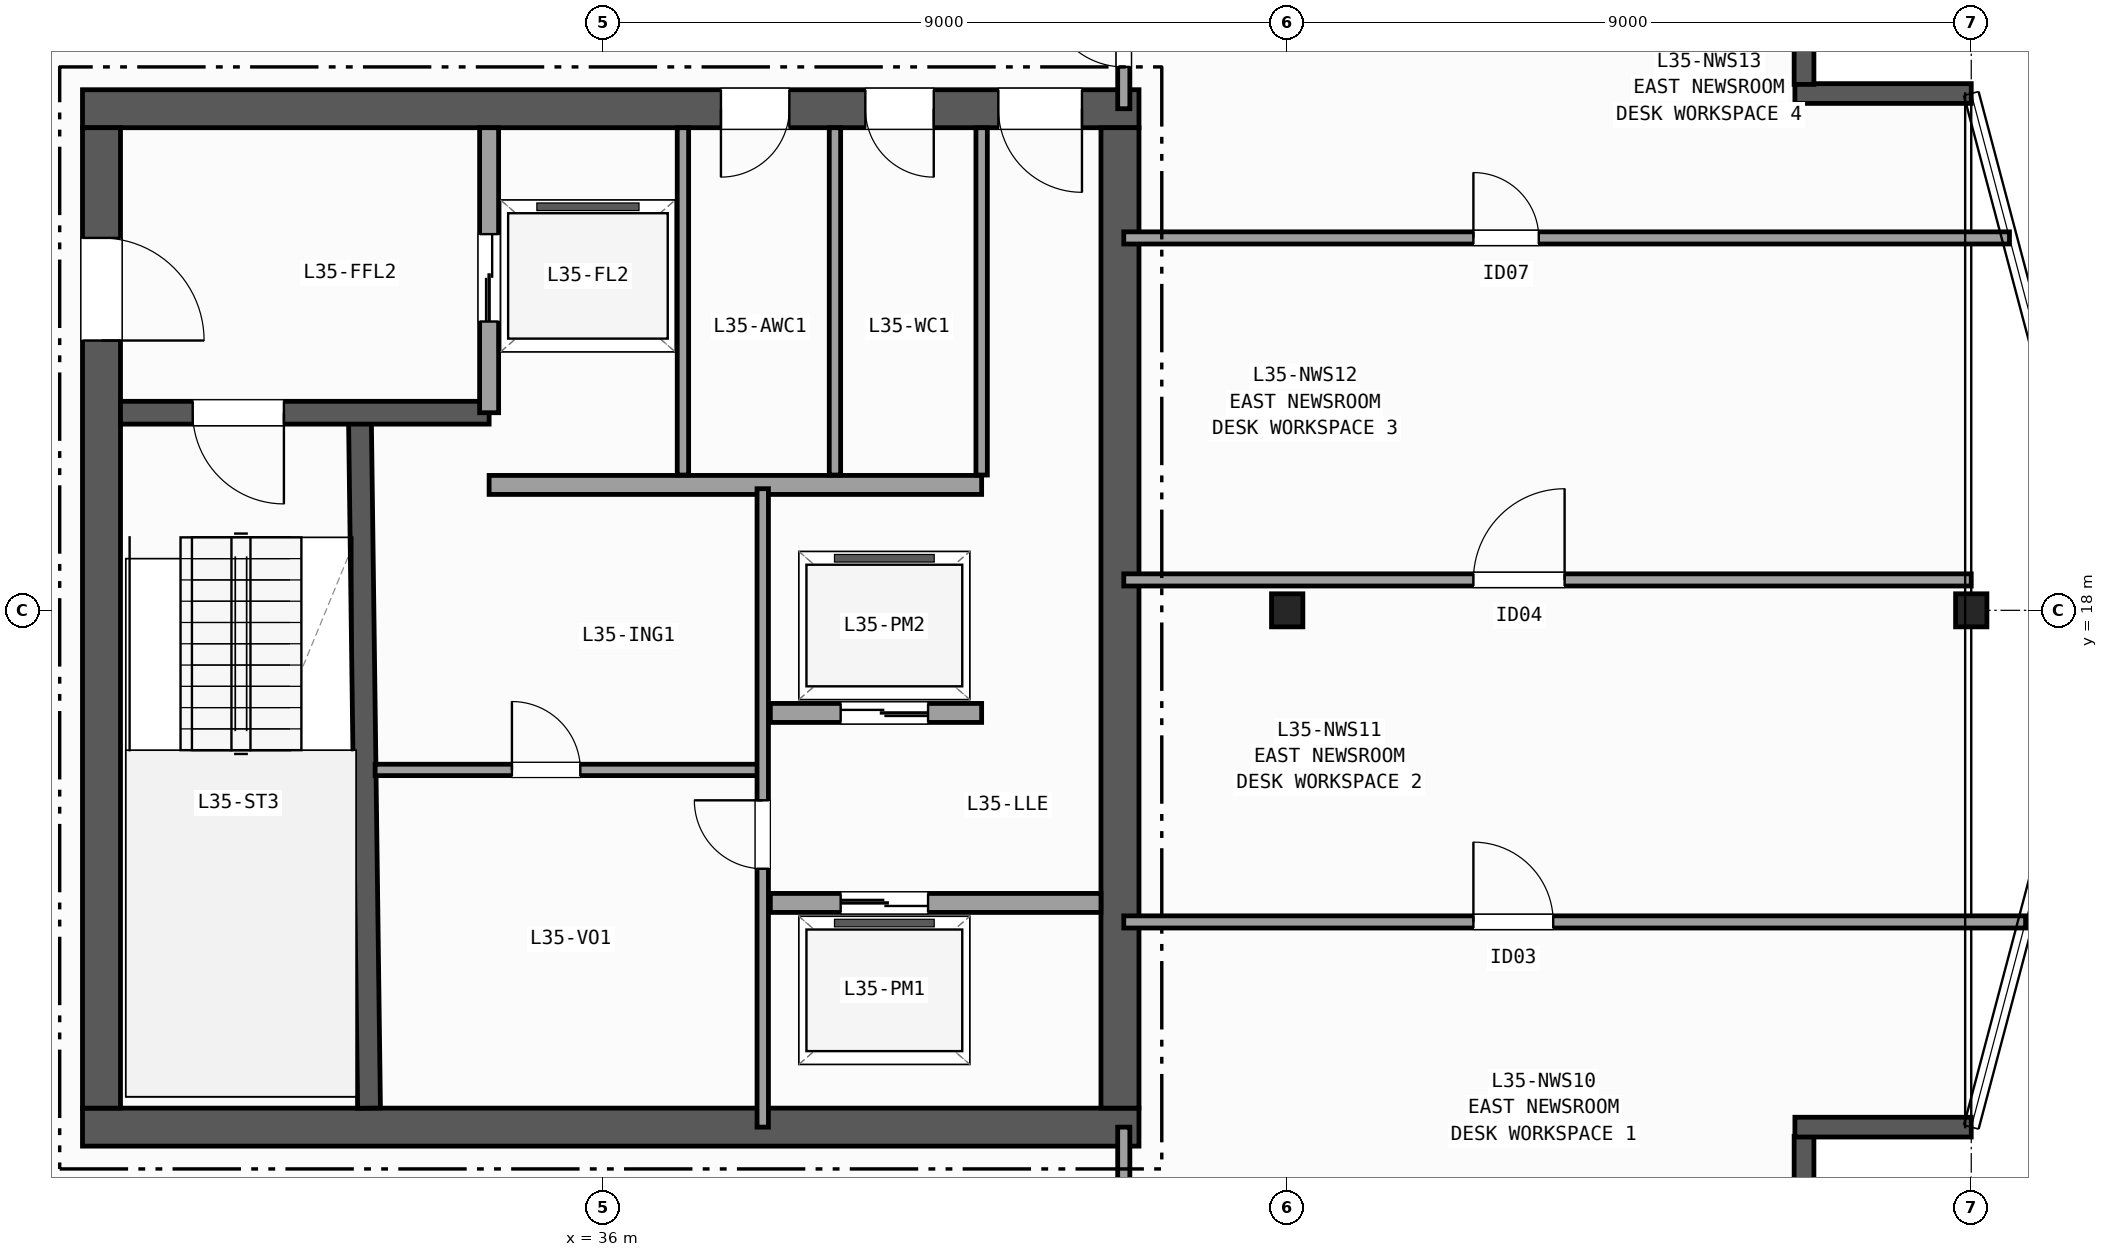
"""IFC4 building model, lengths in metres.
Left out: names, types, materials, properties, quantities, classifications, styles, units other than length and angle.
Written with IfcOpenShell. Run it as: python <this file> out.ifc"""

import sys

from ifc_helpers import new_model, si_unit, direction, frame, frame_2d, origin, origin_2d, place, context, subcontext, project, spatial, rectangle, i_section, extrude, element, fill, save


model = new_model("IFC4")
c1 = context("Model", 3, precision=1e-05, world=origin(), true_north=direction((0.0, 1.0)))
c2 = subcontext(c1, "Body", "Model", "MODEL_VIEW")
j1 = project(units=[si_unit("LENGTHUNIT", "METRE"), si_unit("PLANEANGLEUNIT", "RADIAN")], contexts=[c1])
p1 = place(None, origin())
s1 = spatial("IfcSite", under=j1, at=p1, CompositionType="ELEMENT")
p2 = place(p1, origin())
s2 = spatial("IfcBuilding", under=s1, at=p2, CompositionType="ELEMENT")
p3 = place(p2, frame((0.0, 0.0, 143.3)))
s3 = spatial("IfcBuildingStorey", under=s2, at=p3, CompositionType="ELEMENT", Elevation=143.3)
for number, where, z_axis, x_axis in (
    (1, (45.0, 18.0, 0.0), (0.0, 0.0, 1.0), (1.0, 0.0, 0.0)),
    (2, (54.0, 18.0, 0.0), (0.0, 0.0, 1.0), (1.0, 0.0, 0.0)),
):
    element("IfcColumn", number, at=place(p3, frame(where, z_axis=z_axis, x_axis=x_axis)), inside=s3, PredefinedType="COLUMN", context=c2, shape_type="SweptSolid", body=[
        extrude(i_section(OverallWidth=0.412, OverallDepth=0.435, WebThickness=0.036, FlangeThickness=0.057, FilletRadius=0.015, at=origin_2d()), origin(), (0.0, 0.0, 1.0), 3.7),
    ])
p4 = place(p3, frame((51.8, 9.0, 0.0), z_axis=(0.0, 0.0, 1.0), x_axis=(0.0, 1.0, 0.0)))
e3 = element("IfcWall", 3, at=p4, inside=s3, PredefinedType="SOLIDWALL", context=c2, shape_type="SweptSolid", body=[
    extrude(rectangle(XDim=2.08, YDim=0.26, at=frame_2d((1.04, 0.0))), origin(), (0.0, 0.0, 1.0), 3.42),
])
for number, where, z_axis, x_axis in (
    (4, (51.68, 11.2, 0.0), (0.0, 0.0, 1.0), (1.0, 0.0, 0.0)),
    (5, (54.0, 24.8, 0.0), (0.0, 0.0, 1.0), (-1.0, 0.0, 0.0)),
):
    element("IfcWall", number, at=place(p3, frame(where, z_axis=z_axis, x_axis=x_axis)), inside=s3, PredefinedType="SOLIDWALL", context=c2, shape_type="SweptSolid", body=[
        extrude(rectangle(XDim=2.32, YDim=0.26, at=frame_2d((1.16, 0.0))), origin(), (0.0, 0.0, 1.0), 3.42),
    ])
p5 = place(p3, frame((51.8, 24.92, 0.0), z_axis=(0.0, 0.0, 1.0), x_axis=(0.0, 1.0, 0.0)))
e6 = element("IfcWall", 6, at=p5, inside=s3, PredefinedType="SOLIDWALL", context=c2, shape_type="SweptSolid", body=[
    extrude(rectangle(XDim=2.08, YDim=0.26, at=frame_2d((1.04, 0.0))), origin(), (0.0, 0.0, 1.0), 3.42),
])
p6 = place(p3, frame((29.15, 11.2, 0.0), z_axis=(0.0, 0.0, 1.0), x_axis=(1.0, 0.0, 0.0)))
e7 = element("IfcWall", 7, at=p6, inside=s3, PredefinedType="SHEAR", context=c2, shape_type="SweptSolid", body=[
    extrude(rectangle(XDim=13.9, YDim=0.5, at=frame_2d((6.95, 0.0))), origin(), (0.0, 0.0, 1.0), 3.42),
])
p7 = place(p3, frame((43.05, 24.6, 0.0), z_axis=(0.0, 0.0, 1.0), x_axis=(-1.0, 0.0, 0.0)))
e8 = element("IfcWall", 8, at=p7, inside=s3, PredefinedType="SHEAR", context=c2, shape_type="SweptSolid", body=[
    extrude(rectangle(XDim=13.9, YDim=0.5, at=frame_2d((6.95, 0.0))), origin(), (0.0, 0.0, 1.0), 3.42),
])
p8 = place(p7, frame((0.75, 0.0, 0.0)))
e9 = element("IfcOpeningElement", 9, at=p8, cuts=e8, PredefinedType="OPENING", context=c2, shape_type="SweptSolid", body=[
    extrude(rectangle(XDim=1.1, YDim=2.15, at=frame_2d((0.55, 1.075))), frame((0.0, 0.26, 0.0), z_axis=(0.0, -1.0, 0.0), x_axis=(1.0, 0.0, 0.0)), (0.0, 0.0, 1.0), 0.52),
])
p9 = place(p7, frame((2.7, 0.0, 0.0)))
e10 = element("IfcOpeningElement", 10, at=p9, cuts=e8, PredefinedType="OPENING", context=c2, shape_type="SweptSolid", body=[
    extrude(rectangle(XDim=0.9, YDim=2.1, at=frame_2d((0.45, 1.05))), frame((0.0, 0.26, 0.0), z_axis=(0.0, -1.0, 0.0), x_axis=(1.0, 0.0, 0.0)), (0.0, 0.0, 1.0), 0.52),
])
p10 = place(p7, frame((4.6, 0.0, 0.0)))
e11 = element("IfcOpeningElement", 11, at=p10, cuts=e8, PredefinedType="OPENING", context=c2, shape_type="SweptSolid", body=[
    extrude(rectangle(XDim=0.9, YDim=2.1, at=frame_2d((0.45, 1.05))), frame((0.0, 0.26, 0.0), z_axis=(0.0, -1.0, 0.0), x_axis=(1.0, 0.0, 0.0)), (0.0, 0.0, 1.0), 0.52),
])
p11 = place(p3, frame((29.4, 24.35, 0.0), z_axis=(0.0, 0.0, 1.0), x_axis=(0.0, -1.0, 0.0)))
e12 = element("IfcWall", 12, at=p11, inside=s3, PredefinedType="SHEAR", context=c2, shape_type="SweptSolid", body=[
    extrude(rectangle(XDim=12.9, YDim=0.5, at=frame_2d((6.45, 0.0))), origin(), (0.0, 0.0, 1.0), 3.42),
])
p12 = place(p11, frame((1.45, 0.0, 0.0)))
e13 = element("IfcOpeningElement", 13, at=p12, cuts=e12, PredefinedType="OPENING", context=c2, shape_type="SweptSolid", body=[
    extrude(rectangle(XDim=1.35, YDim=2.15, at=frame_2d((0.675, 1.075))), frame((0.0, 0.26, 0.0), z_axis=(0.0, -1.0, 0.0), x_axis=(1.0, 0.0, 0.0)), (0.0, 0.0, 1.0), 0.52),
])
p13 = place(p3, frame((42.8, 11.45, 0.0), z_axis=(0.0, 0.0, 1.0), x_axis=(0.0, 1.0, 0.0)))
e14 = element("IfcWall", 14, at=p13, inside=s3, PredefinedType="SHEAR", context=c2, shape_type="SweptSolid", body=[
    extrude(rectangle(XDim=12.9, YDim=0.5, at=frame_2d((6.45, 0.0))), origin(), (0.0, 0.0, 1.0), 3.42),
])
p14 = place(p3, frame((32.92, 11.45, 0.0), z_axis=(0.0, 0.0, 1.0), x_axis=(-0.013171578211, 0.999913251001, 0.0)))
e15 = element("IfcWall", 15, at=p14, inside=s3, PredefinedType="SHEAR", context=c2, shape_type="SweptSolid", body=[
    extrude(rectangle(XDim=9.101, YDim=0.3, at=frame_2d((4.55, 0.0))), origin(), (0.0, 0.0, 1.0), 3.42),
])
p15 = place(p3, frame((34.5, 20.6, 0.0), z_axis=(0.0, 0.0, 1.0), x_axis=(-1.0, 0.0, 0.0)))
e16 = element("IfcWall", 16, at=p15, inside=s3, PredefinedType="SHEAR", context=c2, shape_type="SweptSolid", body=[
    extrude(rectangle(XDim=4.85, YDim=0.3, at=frame_2d((2.425, 0.0))), origin(), (0.0, 0.0, 1.0), 3.42),
])
p16 = place(p15, frame((2.7, 0.0, 0.0)))
e17 = element("IfcOpeningElement", 17, at=p16, cuts=e16, PredefinedType="OPENING", context=c2, shape_type="SweptSolid", body=[
    extrude(rectangle(XDim=1.2, YDim=2.15, at=frame_2d((0.6, 1.075))), frame((0.0, 0.16, 0.0), z_axis=(0.0, -1.0, 0.0), x_axis=(1.0, 0.0, 0.0)), (0.0, 0.0, 1.0), 0.32),
])
p17 = place(p3, frame((34.5, 20.6, 0.0), z_axis=(0.0, 0.0, 1.0), x_axis=(0.0, 1.0, 0.0)))
e18 = element("IfcWall", 18, at=p17, inside=s3, PredefinedType="PARTITIONING", context=c2, shape_type="SweptSolid", body=[
    extrude(rectangle(XDim=3.75, YDim=0.25, at=frame_2d((1.875, 0.0))), origin(), (0.0, 0.0, 1.0), 3.42),
])
p18 = place(p17, frame((1.2, 0.0, 0.0)))
e19 = element("IfcOpeningElement", 19, at=p18, cuts=e18, PredefinedType="OPENING", context=c2, shape_type="SweptSolid", body=[
    extrude(rectangle(XDim=1.15, YDim=2.15, at=frame_2d((0.575, 1.075))), frame((0.0, 0.135, 0.0), z_axis=(0.0, -1.0, 0.0), x_axis=(1.0, 0.0, 0.0)), (0.0, 0.0, 1.0), 0.27),
])
p19 = place(p3, frame((34.5, 19.65, 0.0), z_axis=(0.0, 0.0, 1.0), x_axis=(1.0, 0.0, 0.0)))
e20 = element("IfcWall", 20, at=p19, inside=s3, PredefinedType="PARTITIONING", context=c2, shape_type="SweptSolid", body=[
    extrude(rectangle(XDim=6.48, YDim=0.25, at=frame_2d((3.24, 0.0))), origin(), (0.0, 0.0, 1.0), 3.42),
])
p20 = place(p3, frame((38.2, 14.15, 0.0), z_axis=(0.0, 0.0, 1.0), x_axis=(1.0, 0.0, 0.0)))
e21 = element("IfcWall", 21, at=p20, inside=s3, PredefinedType="PARTITIONING", context=c2, shape_type="SweptSolid", body=[
    extrude(rectangle(XDim=4.35, YDim=0.25, at=frame_2d((2.175, 0.0))), origin(), (0.0, 0.0, 1.0), 3.42),
])
p21 = place(p20, frame((0.925, 0.0, 0.0)))
e22 = element("IfcOpeningElement", 22, at=p21, cuts=e21, PredefinedType="OPENING", context=c2, shape_type="SweptSolid", body=[
    extrude(rectangle(XDim=1.15, YDim=2.15, at=frame_2d((0.575, 1.075))), frame((0.0, 0.135, 0.0), z_axis=(0.0, -1.0, 0.0), x_axis=(1.0, 0.0, 0.0)), (0.0, 0.0, 1.0), 0.27),
])
p22 = place(p3, frame((40.98, 16.65, 0.0), z_axis=(0.0, 0.0, 1.0), x_axis=(-1.0, 0.0, 0.0)))
e23 = element("IfcWall", 23, at=p22, inside=s3, PredefinedType="PARTITIONING", context=c2, shape_type="SweptSolid", body=[
    extrude(rectangle(XDim=2.78, YDim=0.25, at=frame_2d((1.39, 0.0))), origin(), (0.0, 0.0, 1.0), 3.42),
])
p23 = place(p22, frame((0.705, 0.0, 0.0)))
e24 = element("IfcOpeningElement", 24, at=p23, cuts=e23, PredefinedType="OPENING", context=c2, shape_type="SweptSolid", body=[
    extrude(rectangle(XDim=1.15, YDim=2.15, at=frame_2d((0.575, 1.075))), frame((0.0, 0.135, 0.0), z_axis=(0.0, -1.0, 0.0), x_axis=(1.0, 0.0, 0.0)), (0.0, 0.0, 1.0), 0.27),
])
p24 = place(p3, frame((33.0, 15.9, 0.0), z_axis=(0.0, 0.0, 1.0), x_axis=(1.0, 0.0, 0.0)))
e25 = element("IfcWall", 25, at=p24, inside=s3, PredefinedType="PARTITIONING", context=c2, shape_type="SweptSolid", body=[
    extrude(rectangle(XDim=5.1, YDim=0.15, at=frame_2d((2.55, 0.0))), origin(), (0.0, 0.0, 1.0), 3.42),
])
p25 = place(p24, frame((1.8, 0.0, 0.0)))
e26 = element("IfcOpeningElement", 26, at=p25, cuts=e25, PredefinedType="OPENING", context=c2, shape_type="SweptSolid", body=[
    extrude(rectangle(XDim=0.9, YDim=2.1, at=frame_2d((0.45, 1.05))), frame((0.0, 0.085, 0.0), z_axis=(0.0, -1.0, 0.0), x_axis=(1.0, 0.0, 0.0)), (0.0, 0.0, 1.0), 0.17),
])
p26 = place(p3, frame((38.1, 11.2, 0.0), z_axis=(0.0, 0.0, 1.0), x_axis=(0.0, 1.0, 0.0)))
e27 = element("IfcWall", 27, at=p26, inside=s3, PredefinedType="PARTITIONING", context=c2, shape_type="SweptSolid", body=[
    extrude(rectangle(XDim=8.4, YDim=0.15, at=frame_2d((4.2, 0.0))), origin(), (0.0, 0.0, 1.0), 3.42),
])
p27 = place(p26, frame((3.4, 0.0, 0.0)))
e28 = element("IfcOpeningElement", 28, at=p27, cuts=e27, PredefinedType="OPENING", context=c2, shape_type="SweptSolid", body=[
    extrude(rectangle(XDim=0.9, YDim=2.1, at=frame_2d((0.45, 1.05))), frame((0.0, 0.085, 0.0), z_axis=(0.0, -1.0, 0.0), x_axis=(1.0, 0.0, 0.0)), (0.0, 0.0, 1.0), 0.17),
])
for number, where, z_axis, x_axis in (
    (29, (37.05, 19.78, 0.0), (0.0, 0.0, 1.0), (0.0, 1.0, 0.0)),
    (30, (39.05, 19.78, 0.0), (0.0, 0.0, 1.0), (0.0, 1.0, 0.0)),
    (31, (40.98, 19.78, 0.0), (0.0, 0.0, 1.0), (0.0, 1.0, 0.0)),
):
    element("IfcWall", number, at=place(p3, frame(where, z_axis=z_axis, x_axis=x_axis)), inside=s3, PredefinedType="PARTITIONING", context=c2, shape_type="SweptSolid", body=[
        extrude(rectangle(XDim=4.57, YDim=0.15, at=frame_2d((2.285, 0.0))), origin(), (0.0, 0.0, 1.0), 3.42),
    ])
p28 = place(p3, frame((42.85, 9.0, 0.0), z_axis=(0.0, 0.0, 1.0), x_axis=(0.0, 1.0, 0.0)))
e32 = element("IfcWall", 32, at=p28, inside=s3, PredefinedType="PARTITIONING", context=c2, shape_type="SweptSolid", body=[
    extrude(rectangle(XDim=2.2, YDim=0.16, at=frame_2d((1.1, 0.0))), origin(), (0.0, 0.0, 1.0), 2.634),
])
p29 = place(p3, frame((42.85, 24.6, 0.0), z_axis=(0.0, 0.0, 1.0), x_axis=(0.0, 1.0, 0.0)))
e33 = element("IfcWall", 33, at=p29, inside=s3, PredefinedType="PARTITIONING", context=c2, shape_type="SweptSolid", body=[
    extrude(rectangle(XDim=2.4, YDim=0.16, at=frame_2d((1.2, 0.0))), origin(), (0.0, 0.0, 1.0), 2.634),
])
p30 = place(p29, frame((0.55, 0.0, 0.0)))
e34 = element("IfcOpeningElement", 34, at=p30, cuts=e33, PredefinedType="OPENING", context=c2, shape_type="SweptSolid", body=[
    extrude(rectangle(XDim=1.0, YDim=2.1, at=frame_2d((0.5, 1.05))), frame((0.0, 0.09, 0.0), z_axis=(0.0, -1.0, 0.0), x_axis=(1.0, 0.0, 0.0)), (0.0, 0.0, 1.0), 0.18),
])
p31 = place(p3, frame((42.85, 13.9, 0.0), z_axis=(0.0, 0.0, 1.0), x_axis=(1.0, 0.0, 0.0)))
e35 = element("IfcWall", 35, at=p31, inside=s3, PredefinedType="PARTITIONING", context=c2, shape_type="SweptSolid", body=[
    extrude(rectangle(XDim=11.865, YDim=0.16, at=frame_2d((5.933, 0.0))), origin(), (0.0, 0.0, 1.0), 3.42),
])
p32 = place(p31, frame((4.6, 0.0, 0.0)))
e36 = element("IfcOpeningElement", 36, at=p32, cuts=e35, PredefinedType="OPENING", context=c2, shape_type="SweptSolid", body=[
    extrude(rectangle(XDim=1.05, YDim=2.15, at=frame_2d((0.525, 1.075))), frame((0.0, 0.09, 0.0), z_axis=(0.0, -1.0, 0.0), x_axis=(1.0, 0.0, 0.0)), (0.0, 0.0, 1.0), 0.18),
])
p33 = place(p3, frame((42.85, 18.4, 0.0), z_axis=(0.0, 0.0, 1.0), x_axis=(1.0, 0.0, 0.0)))
e37 = element("IfcWall", 37, at=p33, inside=s3, PredefinedType="PARTITIONING", context=c2, shape_type="SweptSolid", body=[
    extrude(rectangle(XDim=11.15, YDim=0.16, at=frame_2d((5.575, 0.0))), origin(), (0.0, 0.0, 1.0), 3.42),
])
p34 = place(p33, frame((4.6, 0.0, 0.0)))
e38 = element("IfcOpeningElement", 38, at=p34, cuts=e37, PredefinedType="OPENING", context=c2, shape_type="SweptSolid", body=[
    extrude(rectangle(XDim=1.2, YDim=2.15, at=frame_2d((0.6, 1.075))), frame((0.0, 0.09, 0.0), z_axis=(0.0, -1.0, 0.0), x_axis=(1.0, 0.0, 0.0)), (0.0, 0.0, 1.0), 0.18),
])
p35 = place(p3, frame((42.85, 22.9, 0.0), z_axis=(0.0, 0.0, 1.0), x_axis=(1.0, 0.0, 0.0)))
e39 = element("IfcWall", 39, at=p35, inside=s3, PredefinedType="PARTITIONING", context=c2, shape_type="SweptSolid", body=[
    extrude(rectangle(XDim=11.653, YDim=0.16, at=frame_2d((5.826, 0.0))), origin(), (0.0, 0.0, 1.0), 3.42),
])
p36 = place(p35, frame((4.6, 0.0, 0.0)))
e40 = element("IfcOpeningElement", 40, at=p36, cuts=e39, PredefinedType="OPENING", context=c2, shape_type="SweptSolid", body=[
    extrude(rectangle(XDim=0.86, YDim=2.05, at=frame_2d((0.43, 1.025))), frame((0.0, 0.09, 0.0), z_axis=(0.0, -1.0, 0.0), x_axis=(1.0, 0.0, 0.0)), (0.0, 0.0, 1.0), 0.18),
])
p37 = place(p16, origin())
e41 = element("IfcDoor", 41, at=p37, inside=s3, OperationType="SINGLE_SWING_LEFT", PredefinedType="DOOR", context=c2, shape_type="SweptSolid", body=[
    extrude(rectangle(XDim=1.2, YDim=2.15, at=frame_2d((0.6, 1.075))), frame((0.0, 0.025, 0.0), z_axis=(0.0, -1.0, 0.0), x_axis=(1.0, 0.0, 0.0)), (0.0, 0.0, 1.0), 0.05),
])
fill(e17, e41)
p38 = place(p12, origin())
e42 = element("IfcDoor", 42, at=p38, inside=s3, OperationType="SINGLE_SWING_RIGHT", PredefinedType="DOOR", context=c2, shape_type="SweptSolid", body=[
    extrude(rectangle(XDim=1.35, YDim=2.15, at=frame_2d((0.675, 1.075))), frame((0.0, 0.025, 0.0), z_axis=(0.0, -1.0, 0.0), x_axis=(1.0, 0.0, 0.0)), (0.0, 0.0, 1.0), 0.05),
])
fill(e13, e42)
p39 = place(p8, origin())
e43 = element("IfcDoor", 43, at=p39, inside=s3, OperationType="SINGLE_SWING_LEFT", PredefinedType="DOOR", context=c2, shape_type="SweptSolid", body=[
    extrude(rectangle(XDim=1.1, YDim=2.15, at=frame_2d((0.55, 1.075))), frame((0.0, 0.025, 0.0), z_axis=(0.0, -1.0, 0.0), x_axis=(1.0, 0.0, 0.0)), (0.0, 0.0, 1.0), 0.05),
])
fill(e9, e43)
p40 = place(p9, origin())
e44 = element("IfcDoor", 44, at=p40, inside=s3, OperationType="SINGLE_SWING_LEFT", PredefinedType="DOOR", context=c2, shape_type="SweptSolid", body=[
    extrude(rectangle(XDim=0.9, YDim=2.1, at=frame_2d((0.45, 1.05))), frame((0.0, 0.025, 0.0), z_axis=(0.0, -1.0, 0.0), x_axis=(1.0, 0.0, 0.0)), (0.0, 0.0, 1.0), 0.05),
])
fill(e10, e44)
p41 = place(p10, origin())
e45 = element("IfcDoor", 45, at=p41, inside=s3, OperationType="SINGLE_SWING_RIGHT", PredefinedType="DOOR", context=c2, shape_type="SweptSolid", body=[
    extrude(rectangle(XDim=0.9, YDim=2.1, at=frame_2d((0.45, 1.05))), frame((0.0, 0.025, 0.0), z_axis=(0.0, -1.0, 0.0), x_axis=(1.0, 0.0, 0.0)), (0.0, 0.0, 1.0), 0.05),
])
fill(e11, e45)
p42 = place(p18, origin())
e46 = element("IfcDoor", 46, at=p42, inside=s3, OperationType="DOUBLE_DOOR_SLIDING", PredefinedType="DOOR", context=c2, shape_type="SweptSolid", body=[
    extrude(rectangle(XDim=1.15, YDim=2.15, at=frame_2d((0.575, 1.075))), frame((0.0, 0.025, 0.0), z_axis=(0.0, -1.0, 0.0), x_axis=(1.0, 0.0, 0.0)), (0.0, 0.0, 1.0), 0.05),
])
fill(e19, e46)
p43 = place(p21, origin())
e47 = element("IfcDoor", 47, at=p43, inside=s3, OperationType="DOUBLE_DOOR_SLIDING", PredefinedType="DOOR", context=c2, shape_type="SweptSolid", body=[
    extrude(rectangle(XDim=1.15, YDim=2.15, at=frame_2d((0.575, 1.075))), frame((0.0, 0.025, 0.0), z_axis=(0.0, -1.0, 0.0), x_axis=(1.0, 0.0, 0.0)), (0.0, 0.0, 1.0), 0.05),
])
fill(e22, e47)
p44 = place(p23, origin())
e48 = element("IfcDoor", 48, at=p44, inside=s3, OperationType="DOUBLE_DOOR_SLIDING", PredefinedType="DOOR", context=c2, shape_type="SweptSolid", body=[
    extrude(rectangle(XDim=1.15, YDim=2.15, at=frame_2d((0.575, 1.075))), frame((0.0, 0.025, 0.0), z_axis=(0.0, -1.0, 0.0), x_axis=(1.0, 0.0, 0.0)), (0.0, 0.0, 1.0), 0.05),
])
fill(e24, e48)
p45 = place(p27, origin())
e49 = element("IfcDoor", 49, at=p45, inside=s3, OperationType="SINGLE_SWING_RIGHT", PredefinedType="DOOR", context=c2, shape_type="SweptSolid", body=[
    extrude(rectangle(XDim=0.9, YDim=2.1, at=frame_2d((0.45, 1.05))), frame((0.0, 0.025, 0.0), z_axis=(0.0, -1.0, 0.0), x_axis=(1.0, 0.0, 0.0)), (0.0, 0.0, 1.0), 0.05),
])
fill(e28, e49)
p46 = place(p25, origin())
e50 = element("IfcDoor", 50, at=p46, inside=s3, OperationType="SINGLE_SWING_LEFT", PredefinedType="DOOR", context=c2, shape_type="SweptSolid", body=[
    extrude(rectangle(XDim=0.9, YDim=2.1, at=frame_2d((0.45, 1.05))), frame((0.0, 0.025, 0.0), z_axis=(0.0, -1.0, 0.0), x_axis=(1.0, 0.0, 0.0)), (0.0, 0.0, 1.0), 0.05),
])
fill(e26, e50)
p47 = place(p30, origin())
e51 = element("IfcDoor", 51, at=p47, inside=s3, OperationType="SINGLE_SWING_RIGHT", PredefinedType="DOOR", context=c2, shape_type="SweptSolid", body=[
    extrude(rectangle(XDim=1.0, YDim=2.1, at=frame_2d((0.5, 1.05))), frame((0.0, 0.025, 0.0), z_axis=(0.0, -1.0, 0.0), x_axis=(1.0, 0.0, 0.0)), (0.0, 0.0, 1.0), 0.05),
])
fill(e34, e51)
p48 = place(p32, origin())
e52 = element("IfcDoor", 52, at=p48, inside=s3, OperationType="SINGLE_SWING_LEFT", PredefinedType="DOOR", context=c2, shape_type="SweptSolid", body=[
    extrude(rectangle(XDim=1.05, YDim=2.15, at=frame_2d((0.525, 1.075))), frame((0.0, 0.025, 0.0), z_axis=(0.0, -1.0, 0.0), x_axis=(1.0, 0.0, 0.0)), (0.0, 0.0, 1.0), 0.05),
])
fill(e36, e52)
p49 = place(p34, origin())
e53 = element("IfcDoor", 53, at=p49, inside=s3, OperationType="SINGLE_SWING_RIGHT", PredefinedType="DOOR", context=c2, shape_type="SweptSolid", body=[
    extrude(rectangle(XDim=1.2, YDim=2.15, at=frame_2d((0.6, 1.075))), frame((0.0, 0.025, 0.0), z_axis=(0.0, -1.0, 0.0), x_axis=(1.0, 0.0, 0.0)), (0.0, 0.0, 1.0), 0.05),
])
fill(e38, e53)
p50 = place(p36, origin())
e54 = element("IfcDoor", 54, at=p50, inside=s3, OperationType="SINGLE_SWING_LEFT", PredefinedType="DOOR", context=c2, shape_type="SweptSolid", body=[
    extrude(rectangle(XDim=0.86, YDim=2.05, at=frame_2d((0.43, 1.025))), frame((0.0, 0.025, 0.0), z_axis=(0.0, -1.0, 0.0), x_axis=(1.0, 0.0, 0.0)), (0.0, 0.0, 1.0), 0.05),
])
fill(e40, e54)
save(model, sys.argv[1])
